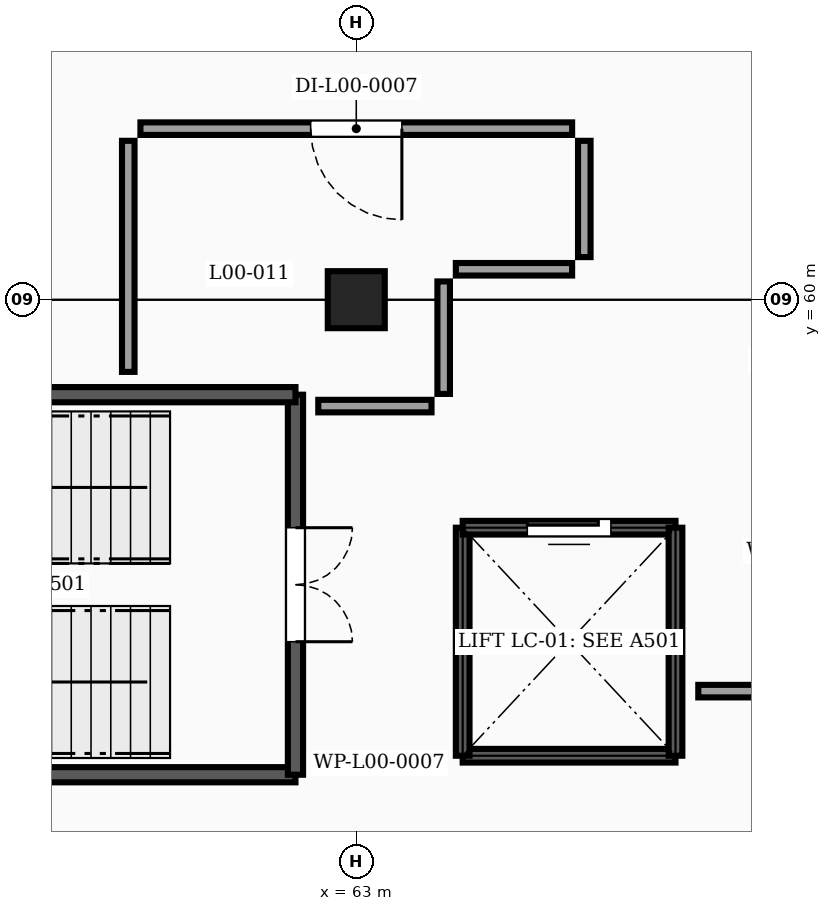
"""IFC4 building model, lengths in metres.
Left out: names, types, materials, properties, quantities, classifications, styles, units other than length and angle.
Written with IfcOpenShell. Run it as: python <this file> out.ifc"""

import sys

from ifc_helpers import new_model, si_unit, direction, frame, frame_2d, origin, origin_2d, place, context, subcontext, project, spatial, rectangle, extrude, element, fill, save


model = new_model("IFC4")
c1 = context("Model", 3, precision=1e-05, world=origin(), true_north=direction((0.0, 1.0)))
c2 = subcontext(c1, "Body", "Model", "MODEL_VIEW")
j1 = project(units=[si_unit("LENGTHUNIT", "METRE"), si_unit("PLANEANGLEUNIT", "RADIAN")], contexts=[c1])
p1 = place(None, origin())
s1 = spatial("IfcSite", under=j1, at=p1, CompositionType="ELEMENT")
p2 = place(p1, origin())
s2 = spatial("IfcBuilding", under=s1, at=p2, CompositionType="ELEMENT")
p3 = place(p2, origin())
s3 = spatial("IfcBuildingStorey", under=s2, at=p3, CompositionType="ELEMENT", Elevation=0.0)
p4 = place(p3, frame((63.0, 60.0, -0.25), z_axis=(0.0, 0.0, 1.0), x_axis=(1.0, 0.0, 0.0)))
e1 = element("IfcColumn", 1, at=p4, inside=s3, PredefinedType="COLUMN", context=c2, shape_type="SweptSolid", body=[
    extrude(rectangle(XDim=0.75, YDim=0.75, at=origin_2d()), origin(), (0.0, 0.0, 1.0), 4.75),
])
p5 = place(p3, frame((54.8, 53.75, 0.0), z_axis=(0.0, 0.0, 1.0), x_axis=(1.0, 0.0, 0.0)))
e2 = element("IfcWall", 2, at=p5, inside=s3, PredefinedType="SHEAR", context=c2, shape_type="SweptSolid", body=[
    extrude(rectangle(XDim=7.4, YDim=0.2, at=frame_2d((3.7, 0.0))), origin(), (0.0, 0.0, 1.0), 4.08),
])
p6 = place(p3, frame((62.2, 58.75, 0.0), z_axis=(0.0, 0.0, 1.0), x_axis=(0.0, -1.0, 0.0)))
e3 = element("IfcWall", 3, at=p6, inside=s3, PredefinedType="SHEAR", context=c2, shape_type="SweptSolid", body=[
    extrude(rectangle(XDim=5.0, YDim=0.2, at=frame_2d((2.5, 0.0))), origin(), (0.0, 0.0, 1.0), 4.08),
])
p7 = place(p6, frame((1.75, 0.0, 0.0)))
e4 = element("IfcOpeningElement", 4, at=p7, cuts=e3, PredefinedType="OPENING", context=c2, shape_type="SweptSolid", body=[
    extrude(rectangle(XDim=1.5, YDim=2.15, at=frame_2d((0.75, 1.075))), frame((0.0, 0.11, 0.0), z_axis=(0.0, -1.0, 0.0), x_axis=(1.0, 0.0, 0.0)), (0.0, 0.0, 1.0), 0.22),
])
p8 = place(p3, frame((62.2, 58.75, 0.0), z_axis=(0.0, 0.0, 1.0), x_axis=(-1.0, 0.0, 0.0)))
e5 = element("IfcWall", 5, at=p8, inside=s3, PredefinedType="SHEAR", context=c2, shape_type="SweptSolid", body=[
    extrude(rectangle(XDim=7.4, YDim=0.2, at=frame_2d((3.7, 0.0))), origin(), (0.0, 0.0, 1.0), 4.08),
])
p9 = place(p3, frame((67.2, 54.0, -0.2), z_axis=(0.0, 0.0, 1.0), x_axis=(-1.0, 0.0, 0.0)))
e6 = element("IfcWall", 6, at=p9, inside=s3, PredefinedType="SHEAR", context=c2, shape_type="SweptSolid", body=[
    extrude(rectangle(XDim=2.8, YDim=0.18, at=frame_2d((1.4, 0.0))), origin(), (0.0, 0.0, 1.0), 4.28),
])
p10 = place(p3, frame((64.4, 54.0, -0.2), z_axis=(0.0, 0.0, 1.0), x_axis=(0.0, 1.0, 0.0)))
e7 = element("IfcWall", 7, at=p10, inside=s3, PredefinedType="SHEAR", context=c2, shape_type="SweptSolid", body=[
    extrude(rectangle(XDim=3.0, YDim=0.18, at=frame_2d((1.5, 0.0))), origin(), (0.0, 0.0, 1.0), 4.28),
])
p11 = place(p3, frame((64.4, 57.0, -0.2), z_axis=(0.0, 0.0, 1.0), x_axis=(1.0, 0.0, 0.0)))
e8 = element("IfcWall", 8, at=p11, inside=s3, PredefinedType="SHEAR", context=c2, shape_type="SweptSolid", body=[
    extrude(rectangle(XDim=2.8, YDim=0.18, at=frame_2d((1.4, 0.0))), origin(), (0.0, 0.0, 1.0), 4.28),
])
p12 = place(p11, frame((0.85, 0.0, 0.2)))
e9 = element("IfcOpeningElement", 9, at=p12, cuts=e8, PredefinedType="OPENING", context=c2, shape_type="SweptSolid", body=[
    extrude(rectangle(XDim=1.1, YDim=2.15, at=frame_2d((0.55, 1.075))), frame((0.0, 0.1, 0.0), z_axis=(0.0, -1.0, 0.0), x_axis=(1.0, 0.0, 0.0)), (0.0, 0.0, 1.0), 0.2),
])
p13 = place(p3, frame((67.2, 57.0, -0.2), z_axis=(0.0, 0.0, 1.0), x_axis=(0.0, -1.0, 0.0)))
e10 = element("IfcWall", 10, at=p13, inside=s3, PredefinedType="SHEAR", context=c2, shape_type="SweptSolid", body=[
    extrude(rectangle(XDim=3.0, YDim=0.18, at=frame_2d((1.5, 0.0))), origin(), (0.0, 0.0, 1.0), 4.28),
])
p14 = place(p3, frame((64.1, 53.9, 0.0), z_axis=(0.0, 0.0, 1.0), x_axis=(-1.0, 0.0, 0.0)))
e11 = element("IfcWall", 11, at=p14, inside=s3, PredefinedType="PARTITIONING", context=c2, shape_type="SweptSolid", body=[
    extrude(rectangle(XDim=1.6, YDim=0.165, at=frame_2d((0.8, 0.0))), origin(), (0.0, 0.0, 1.0), 4.08),
])
p15 = place(p3, frame((68.74, 54.85, 0.0), z_axis=(0.0, 0.0, 1.0), x_axis=(-1.0, 0.0, 0.0)))
e12 = element("IfcWall", 12, at=p15, inside=s3, PredefinedType="PARTITIONING", context=c2, shape_type="SweptSolid", body=[
    extrude(rectangle(XDim=1.24, YDim=0.165, at=frame_2d((0.62, 0.0))), origin(), (0.0, 0.0, 1.0), 4.08),
])
p16 = place(p3, frame((62.5, 58.6, 0.0), z_axis=(0.0, 0.0, 1.0), x_axis=(1.0, 0.0, 0.0)))
e13 = element("IfcWall", 13, at=p16, inside=s3, PredefinedType="PARTITIONING", context=c2, shape_type="SweptSolid", body=[
    extrude(rectangle(XDim=1.49, YDim=0.165, at=frame_2d((0.745, 0.0))), origin(), (0.0, 0.0, 1.0), 4.08),
])
p17 = place(p3, frame((64.15, 58.76, 0.0), z_axis=(0.0, 0.0, 1.0), x_axis=(0.0, 1.0, 0.0)))
e14 = element("IfcWall", 14, at=p17, inside=s3, PredefinedType="PARTITIONING", context=c2, shape_type="SweptSolid", body=[
    extrude(rectangle(XDim=1.48, YDim=0.165, at=frame_2d((0.74, 0.0))), origin(), (0.0, 0.0, 1.0), 4.08),
])
p18 = place(p3, frame((64.31, 60.4, 0.0), z_axis=(0.0, 0.0, 1.0), x_axis=(1.0, 0.0, 0.0)))
e15 = element("IfcWall", 15, at=p18, inside=s3, PredefinedType="PARTITIONING", context=c2, shape_type="SweptSolid", body=[
    extrude(rectangle(XDim=1.53, YDim=0.165, at=frame_2d((0.765, 0.0))), origin(), (0.0, 0.0, 1.0), 2.872),
])
p19 = place(p3, frame((66.0, 60.56, 0.0), z_axis=(0.0, 0.0, 1.0), x_axis=(0.0, 1.0, 0.0)))
e16 = element("IfcWall", 16, at=p19, inside=s3, PredefinedType="PARTITIONING", context=c2, shape_type="SweptSolid", body=[
    extrude(rectangle(XDim=1.53, YDim=0.165, at=frame_2d((0.765, 0.0))), origin(), (0.0, 0.0, 1.0), 3.622),
])
p20 = place(p3, frame((65.84, 62.25, 0.0), z_axis=(0.0, 0.0, 1.0), x_axis=(-1.0, 0.0, 0.0)))
e17 = element("IfcWall", 17, at=p20, inside=s3, PredefinedType="PARTITIONING", context=c2, shape_type="SweptSolid", body=[
    extrude(rectangle(XDim=5.68, YDim=0.165, at=frame_2d((2.84, 0.0))), origin(), (0.0, 0.0, 1.0), 4.08),
])
p21 = place(p20, frame((2.24, 0.0, 0.0)))
e18 = element("IfcOpeningElement", 18, at=p21, cuts=e17, PredefinedType="OPENING", context=c2, shape_type="SweptSolid", body=[
    extrude(rectangle(XDim=1.2, YDim=2.15, at=frame_2d((0.6, 1.075))), frame((0.0, 0.093, 0.0), z_axis=(0.0, -1.0, 0.0), x_axis=(1.0, 0.0, 0.0)), (0.0, 0.0, 1.0), 0.185),
])
p22 = place(p3, frame((60.0, 62.09, 0.0), z_axis=(0.0, 0.0, 1.0), x_axis=(0.0, -1.0, 0.0)))
e19 = element("IfcWall", 19, at=p22, inside=s3, PredefinedType="PARTITIONING", context=c2, shape_type="SweptSolid", body=[
    extrude(rectangle(XDim=3.04, YDim=0.165, at=frame_2d((1.52, 0.0))), origin(), (0.0, 0.0, 1.0), 3.622),
])
p23 = place(p7, origin())
e20 = element("IfcDoor", 20, at=p23, inside=s3, OperationType="DOUBLE_DOOR_SINGLE_SWING", PredefinedType="DOOR", context=c2, shape_type="SweptSolid", body=[
    extrude(rectangle(XDim=1.5, YDim=2.15, at=frame_2d((0.75, 1.075))), frame((0.0, 0.025, 0.0), z_axis=(0.0, -1.0, 0.0), x_axis=(1.0, 0.0, 0.0)), (0.0, 0.0, 1.0), 0.05),
])
fill(e4, e20)
p24 = place(p12, origin())
e21 = element("IfcDoor", 21, at=p24, inside=s3, OperationType="SLIDING_TO_LEFT", PredefinedType="DOOR", context=c2, shape_type="SweptSolid", body=[
    extrude(rectangle(XDim=1.1, YDim=2.15, at=frame_2d((0.55, 1.075))), frame((0.0, 0.025, 0.0), z_axis=(0.0, -1.0, 0.0), x_axis=(1.0, 0.0, 0.0)), (0.0, 0.0, 1.0), 0.05),
])
fill(e9, e21)
p25 = place(p21, origin())
e22 = element("IfcDoor", 22, at=p25, inside=s3, OperationType="SINGLE_SWING_LEFT", PredefinedType="DOOR", context=c2, shape_type="SweptSolid", body=[
    extrude(rectangle(XDim=1.2, YDim=2.15, at=frame_2d((0.6, 1.075))), frame((0.0, 0.025, 0.0), z_axis=(0.0, -1.0, 0.0), x_axis=(1.0, 0.0, 0.0)), (0.0, 0.0, 1.0), 0.05),
])
fill(e18, e22)
save(model, sys.argv[1])
